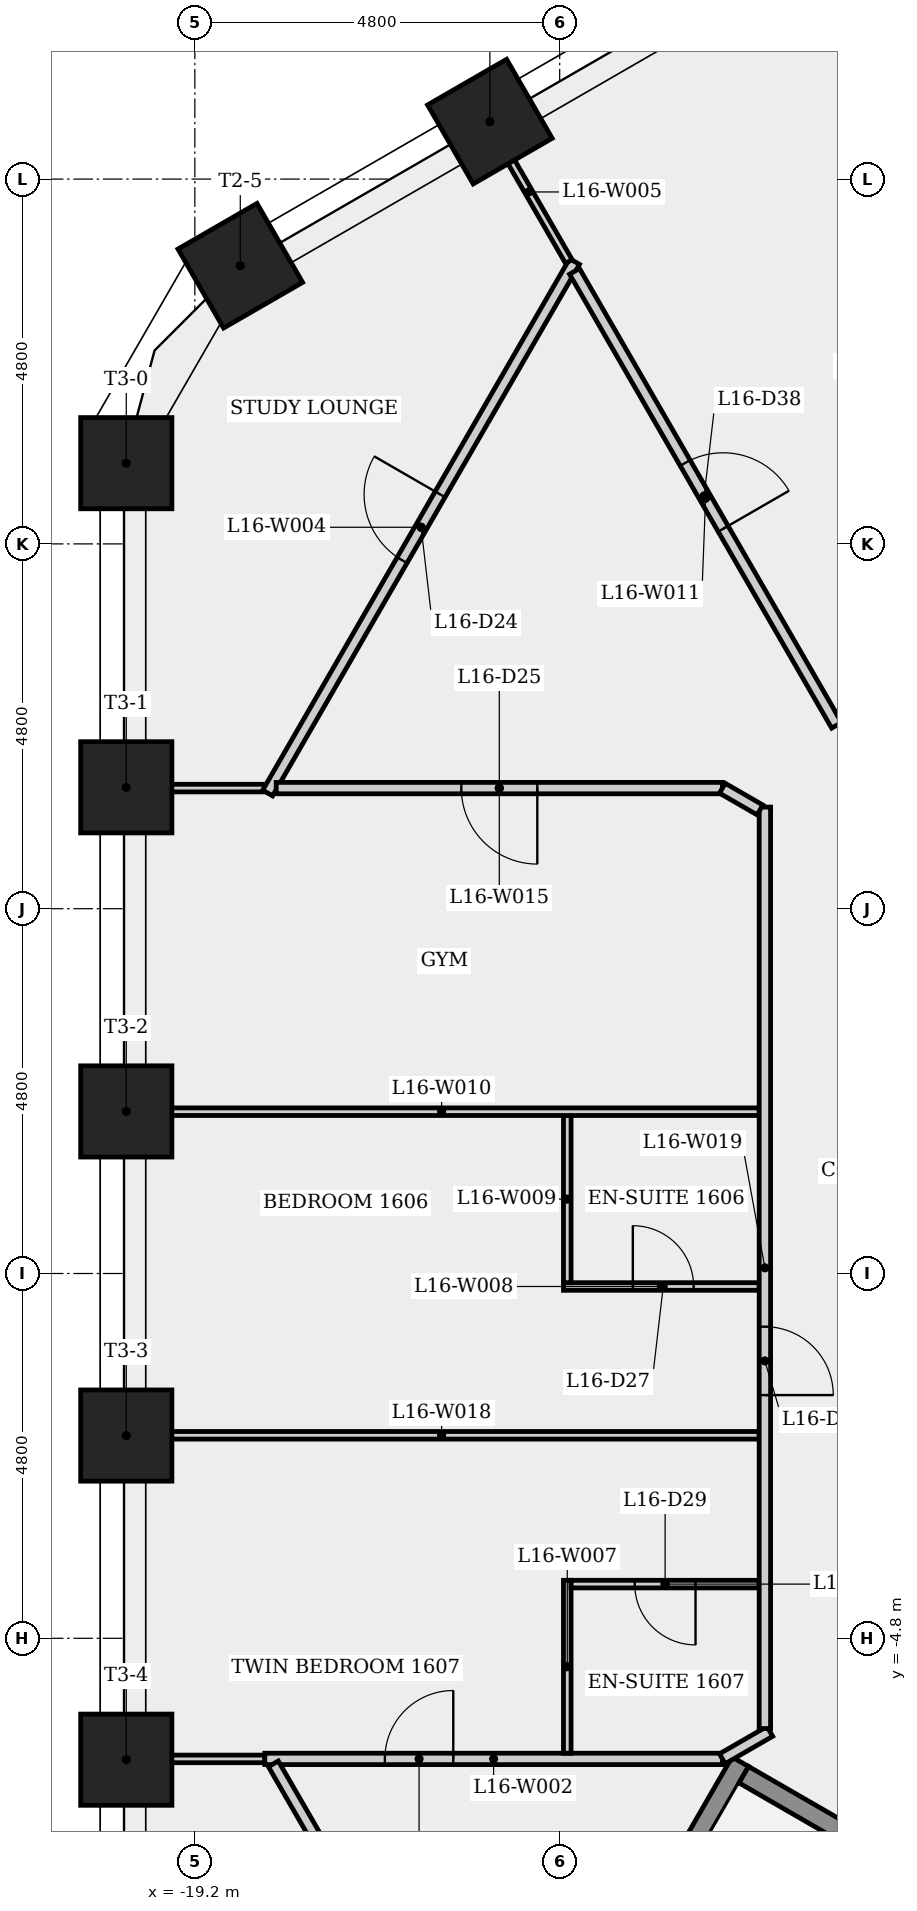
"""IFC4 building model, lengths in metres.
Left out: names, types, materials, properties, quantities, classifications, styles, units other than length and angle.
Written with IfcOpenShell. Run it as: python <this file> out.ifc"""

import sys

from ifc_helpers import new_model, si_unit, direction, frame, frame_2d, origin, origin_2d, place, context, subcontext, project, spatial, rectangle, extrude, element, fill, save


model = new_model("IFC4")
c1 = context("Model", 3, precision=1e-05, world=origin(), true_north=direction((0.0, 1.0)))
c2 = subcontext(c1, "Body", "Model", "MODEL_VIEW")
j1 = project(units=[si_unit("LENGTHUNIT", "METRE"), si_unit("PLANEANGLEUNIT", "RADIAN")], contexts=[c1])
p1 = place(None, origin())
s1 = spatial("IfcSite", under=j1, at=p1, CompositionType="ELEMENT")
p2 = place(p1, origin())
s2 = spatial("IfcBuilding", under=s1, at=p2, CompositionType="ELEMENT")
p3 = place(p2, frame((0.0, 0.0, 62.9)))
s3 = spatial("IfcBuildingStorey", under=s2, at=p3, CompositionType="ELEMENT", Elevation=62.9)
for number, where, z_axis, x_axis in (
    (1, (-15.318, 15.156, 0.0), (0.0, 0.0, 1.0), (-0.5, 0.866, 0.0)),
    (2, (-18.602, 13.26, 0.0), (0.0, 0.0, 1.0), (-0.5, 0.866, 0.0)),
    (3, (-20.102, 10.662, 0.0), (0.0, 0.0, 1.0), (-1.0, 0.0, 0.0)),
    (4, (-20.102, 6.397, 0.0), (0.0, 0.0, 1.0), (-1.0, 0.0, 0.0)),
    (5, (-20.102, 2.132, 0.0), (0.0, 0.0, 1.0), (-1.0, 0.0, 0.0)),
    (6, (-20.102, -2.132, 0.0), (0.0, 0.0, 1.0), (-1.0, 0.0, 0.0)),
    (7, (-20.102, -6.397, 0.0), (0.0, 0.0, 1.0), (-1.0, 0.0, 0.0)),
):
    element("IfcColumn", number, at=place(p3, frame(where, z_axis=z_axis, x_axis=x_axis)), inside=s3, PredefinedType="COLUMN", context=c2, shape_type="SweptSolid", body=[
        extrude(rectangle(XDim=1.2, YDim=1.2, at=origin_2d()), origin(), (0.0, 0.0, 1.0), 3.4),
    ])
p4 = place(p3, frame((-18.28, -6.387, 0.0), z_axis=(0.0, 0.0, 1.0), x_axis=(-1.0, 0.0, 0.0)))
e8 = element("IfcWall", 8, at=p4, inside=s3, PredefinedType="PARTITIONING", context=c2, shape_type="SweptSolid", body=[
    extrude(rectangle(XDim=1.852, YDim=0.1, at=frame_2d((0.926, 0.0))), origin(), (0.0, 0.0, 1.0), 3.0),
])
p5 = place(p3, frame((-18.28, -6.387, 0.0), z_axis=(0.0, 0.0, 1.0), x_axis=(1.0, 0.0, 0.0)))
e9 = element("IfcWall", 9, at=p5, inside=s3, PredefinedType="PARTITIONING", context=c2, shape_type="SweptSolid", body=[
    extrude(rectangle(XDim=6.021, YDim=0.15, at=frame_2d((3.01, 0.0))), origin(), (0.0, 0.0, 1.0), 3.0),
])
p6 = place(p5, frame((1.58, 0.0, 0.0)))
e10 = element("IfcOpeningElement", 10, at=p6, cuts=e9, PredefinedType="OPENING", context=c2, shape_type="SweptSolid", body=[
    extrude(rectangle(XDim=0.9, YDim=2.1, at=frame_2d((0.45, 1.05))), frame((0.0, 0.085, 0.0), z_axis=(0.0, -1.0, 0.0), x_axis=(1.0, 0.0, 0.0)), (0.0, 0.0, 1.0), 0.17),
])
p7 = place(p3, frame((-18.28, 6.387, 0.0), z_axis=(0.0, 0.0, 1.0), x_axis=(-1.0, 0.0, 0.0)))
e11 = element("IfcWall", 11, at=p7, inside=s3, PredefinedType="PARTITIONING", context=c2, shape_type="SweptSolid", body=[
    extrude(rectangle(XDim=1.852, YDim=0.1, at=frame_2d((0.926, 0.0))), origin(), (0.0, 0.0, 1.0), 3.0),
])
p8 = place(p3, frame((-18.242, 6.322, 0.0), z_axis=(0.0, 0.0, 1.0), x_axis=(0.499995499922, 0.86602800189, 0.0)))
e12 = element("IfcWall", 12, at=p8, inside=s3, PredefinedType="PARTITIONING", context=c2, shape_type="SweptSolid", body=[
    extrude(rectangle(XDim=8.075, YDim=0.15, at=frame_2d((4.038, 0.0))), origin(), (0.0, 0.0, 1.0), 3.0),
])
p9 = place(p8, frame((3.538, 0.0, 0.0)))
e13 = element("IfcOpeningElement", 13, at=p9, cuts=e12, PredefinedType="OPENING", context=c2, shape_type="SweptSolid", body=[
    extrude(rectangle(XDim=1.0, YDim=2.1, at=frame_2d((0.5, 1.05))), frame((0.0, 0.085, 0.0), z_axis=(0.0, -1.0, 0.0), x_axis=(1.0, 0.0, 0.0)), (0.0, 0.0, 1.0), 0.17),
])
p10 = place(p3, frame((-15.336, 15.146, 0.0), z_axis=(0.0, 0.0, 1.0), x_axis=(0.499965779899, -0.866045159867, 0.0)))
e14 = element("IfcWall", 14, at=p10, inside=s3, PredefinedType="PARTITIONING", context=c2, shape_type="SweptSolid", body=[
    extrude(rectangle(XDim=2.114, YDim=0.1, at=frame_2d((1.057, 0.0))), origin(), (0.0, 0.0, 1.0), 3.0),
])
p11 = place(p3, frame((-15.065, -11.824, 0.0), z_axis=(0.0, 0.0, 1.0), x_axis=(-0.499999547685, 0.866025664929, 0.0)))
e15 = element("IfcWall", 15, at=p11, inside=s3, PredefinedType="PARTITIONING", context=c2, shape_type="SweptSolid", body=[
    extrude(rectangle(XDim=6.203, YDim=0.15, at=frame_2d((3.102, 0.0))), origin(), (0.0, 0.0, 1.0), 3.0),
])
p12 = place(p11, frame((2.639, 0.0, 0.0)))
e16 = element("IfcOpeningElement", 16, at=p12, cuts=e15, PredefinedType="OPENING", context=c2, shape_type="SweptSolid", body=[
    extrude(rectangle(XDim=1.0, YDim=2.1, at=frame_2d((0.5, 1.05))), frame((0.0, 0.085, 0.0), z_axis=(0.0, -1.0, 0.0), x_axis=(1.0, 0.0, 0.0)), (0.0, 0.0, 1.0), 0.17),
])
p13 = place(p3, frame((-14.3, -4.037, 0.0), z_axis=(0.0, 0.0, 1.0), x_axis=(0.0, -1.0, 0.0)))
e17 = element("IfcWall", 17, at=p13, inside=s3, PredefinedType="PARTITIONING", context=c2, shape_type="SweptSolid", body=[
    extrude(rectangle(XDim=2.275, YDim=0.1, at=frame_2d((1.138, 0.0))), origin(), (0.0, 0.0, 1.0), 3.0),
])
p14 = place(p3, frame((-14.35, -0.171, 0.0), z_axis=(0.0, 0.0, 1.0), x_axis=(1.0, 0.0, 0.0)))
e18 = element("IfcWall", 18, at=p14, inside=s3, PredefinedType="PARTITIONING", context=c2, shape_type="SweptSolid", body=[
    extrude(rectangle(XDim=2.575, YDim=0.1, at=frame_2d((1.288, 0.0))), origin(), (0.0, 0.0, 1.0), 3.0),
])
p15 = place(p14, frame((0.913, 0.0, 0.0)))
e19 = element("IfcOpeningElement", 19, at=p15, cuts=e18, PredefinedType="OPENING", context=c2, shape_type="SweptSolid", body=[
    extrude(rectangle(XDim=0.8, YDim=2.1, at=frame_2d((0.4, 1.05))), frame((0.0, 0.06, 0.0), z_axis=(0.0, -1.0, 0.0), x_axis=(1.0, 0.0, 0.0)), (0.0, 0.0, 1.0), 0.12),
])
p16 = place(p3, frame((-14.3, 2.079, 0.0), z_axis=(0.0, 0.0, 1.0), x_axis=(0.0, -1.0, 0.0)))
e20 = element("IfcWall", 20, at=p16, inside=s3, PredefinedType="PARTITIONING", context=c2, shape_type="SweptSolid", body=[
    extrude(rectangle(XDim=2.2, YDim=0.1, at=frame_2d((1.1, 0.0))), origin(), (0.0, 0.0, 1.0), 3.0),
])
p17 = place(p3, frame((-20.132, 2.129, 0.0), z_axis=(0.0, 0.0, 1.0), x_axis=(1.0, 0.0, 0.0)))
e21 = element("IfcWall", 21, at=p17, inside=s3, PredefinedType="PARTITIONING", context=c2, shape_type="SweptSolid", body=[
    extrude(rectangle(XDim=8.357, YDim=0.1, at=frame_2d((4.178, 0.0))), origin(), (0.0, 0.0, 1.0), 3.0),
])
p18 = place(p3, frame((-14.204, 13.186, 0.0), z_axis=(0.0, 0.0, 1.0), x_axis=(0.500022773673, -0.866012254999, 0.0)))
e22 = element("IfcWall", 22, at=p18, inside=s3, PredefinedType="PARTITIONING", context=c2, shape_type="SweptSolid", body=[
    extrude(rectangle(XDim=6.896, YDim=0.15, at=frame_2d((3.448, 0.0))), origin(), (0.0, 0.0, 1.0), 3.0),
])
p19 = place(p18, frame((2.911, 0.0, 0.0)))
e23 = element("IfcOpeningElement", 23, at=p19, cuts=e22, PredefinedType="OPENING", context=c2, shape_type="SweptSolid", body=[
    extrude(rectangle(XDim=1.0, YDim=2.1, at=frame_2d((0.5, 1.05))), frame((0.0, 0.085, 0.0), z_axis=(0.0, -1.0, 0.0), x_axis=(1.0, 0.0, 0.0)), (0.0, 0.0, 1.0), 0.17),
])
p20 = place(p3, frame((-13.648, -9.239, 0.0), z_axis=(0.0, 0.0, 1.0), x_axis=(0.500017246033, 0.866015446554, 0.0)))
e24 = element("IfcWall", 24, at=p20, inside=s3, PredefinedType="SHEAR", context=c2, shape_type="SweptSolid", body=[
    extrude(rectangle(XDim=3.25, YDim=0.25, at=frame_2d((1.625, 0.0))), origin(), (0.0, 0.0, 1.0), 3.0),
])
p21 = place(p3, frame((-12.26, -6.385, 0.0), z_axis=(0.0, 0.0, 1.0), x_axis=(0.865943239699, 0.500142285375, 0.0)))
e25 = element("IfcWall", 25, at=p21, inside=s3, PredefinedType="PARTITIONING", context=c2, shape_type="SweptSolid", body=[
    extrude(rectangle(XDim=0.721, YDim=0.15, at=frame_2d((0.361, 0.0))), origin(), (0.0, 0.0, 1.0), 3.0),
])
p22 = place(p3, frame((-12.259, 6.387, 0.0), z_axis=(0.0, 0.0, 1.0), x_axis=(-1.0, 0.0, 0.0)))
e26 = element("IfcWall", 26, at=p22, inside=s3, PredefinedType="PARTITIONING", context=c2, shape_type="SweptSolid", body=[
    extrude(rectangle(XDim=5.871, YDim=0.15, at=frame_2d((2.935, 0.0))), origin(), (0.0, 0.0, 1.0), 3.0),
])
p23 = place(p22, frame((2.435, 0.0, 0.0)))
e27 = element("IfcOpeningElement", 27, at=p23, cuts=e26, PredefinedType="OPENING", context=c2, shape_type="SweptSolid", body=[
    extrude(rectangle(XDim=1.0, YDim=2.1, at=frame_2d((0.5, 1.05))), frame((0.0, 0.085, 0.0), z_axis=(0.0, -1.0, 0.0), x_axis=(1.0, 0.0, 0.0)), (0.0, 0.0, 1.0), 0.17),
])
p24 = place(p3, frame((-11.977, -6.595, 0.0), z_axis=(0.0, 0.0, 1.0), x_axis=(0.866025499775, -0.499999833739, 0.0)))
e28 = element("IfcWall", 28, at=p24, inside=s3, PredefinedType="SHEAR", context=c2, shape_type="SweptSolid", body=[
    extrude(rectangle(XDim=6.4, YDim=0.25, at=frame_2d((3.2, 0.0))), origin(), (0.0, 0.0, 1.0), 3.0),
])
p25 = place(p24, frame((5.025, 0.0, 0.0)))
e29 = element("IfcOpeningElement", 29, at=p25, cuts=e28, PredefinedType="OPENING", context=c2, shape_type="SweptSolid", body=[
    extrude(rectangle(XDim=1.0, YDim=2.1, at=frame_2d((0.5, 1.05))), frame((0.0, 0.135, 0.0), z_axis=(0.0, -1.0, 0.0), x_axis=(1.0, 0.0, 0.0)), (0.0, 0.0, 1.0), 0.27),
])
p26 = place(p3, frame((-11.775, -4.087, 0.0), z_axis=(0.0, 0.0, 1.0), x_axis=(-1.0, 0.0, 0.0)))
e30 = element("IfcWall", 30, at=p26, inside=s3, PredefinedType="PARTITIONING", context=c2, shape_type="SweptSolid", body=[
    extrude(rectangle(XDim=2.475, YDim=0.1, at=frame_2d((1.238, 0.0))), origin(), (0.0, 0.0, 1.0), 3.0),
])
p27 = place(p26, frame((0.837, 0.0, 0.0)))
e31 = element("IfcOpeningElement", 31, at=p27, cuts=e30, PredefinedType="OPENING", context=c2, shape_type="SweptSolid", body=[
    extrude(rectangle(XDim=0.8, YDim=2.1, at=frame_2d((0.4, 1.05))), frame((0.0, 0.06, 0.0), z_axis=(0.0, -1.0, 0.0), x_axis=(1.0, 0.0, 0.0)), (0.0, 0.0, 1.0), 0.12),
])
p28 = place(p3, frame((-11.775, -2.129, 0.0), z_axis=(0.0, 0.0, 1.0), x_axis=(-1.0, 0.0, 0.0)))
e32 = element("IfcWall", 32, at=p28, inside=s3, PredefinedType="PARTITIONING", context=c2, shape_type="SweptSolid", body=[
    extrude(rectangle(XDim=8.357, YDim=0.1, at=frame_2d((4.178, 0.0))), origin(), (0.0, 0.0, 1.0), 3.0),
])
p29 = place(p3, frame((-11.7, 6.137, 0.0), z_axis=(0.0, 0.0, 1.0), x_axis=(0.0, -1.0, 0.0)))
e33 = element("IfcWall", 33, at=p29, inside=s3, PredefinedType="PARTITIONING", context=c2, shape_type="SweptSolid", body=[
    extrude(rectangle(XDim=12.125, YDim=0.15, at=frame_2d((6.062, 0.0))), origin(), (0.0, 0.0, 1.0), 3.0),
])
p30 = place(p29, frame((6.837, 0.0, 0.0)))
e34 = element("IfcOpeningElement", 34, at=p30, cuts=e33, PredefinedType="OPENING", context=c2, shape_type="SweptSolid", body=[
    extrude(rectangle(XDim=0.9, YDim=2.1, at=frame_2d((0.45, 1.05))), frame((0.0, 0.085, 0.0), z_axis=(0.0, -1.0, 0.0), x_axis=(1.0, 0.0, 0.0)), (0.0, 0.0, 1.0), 0.17),
])
p31 = place(p3, frame((-11.765, 6.1, 0.0), z_axis=(0.0, 0.0, 1.0), x_axis=(-0.865893856247, 0.500227777832, 0.0)))
e35 = element("IfcWall", 35, at=p31, inside=s3, PredefinedType="PARTITIONING", context=c2, shape_type="SweptSolid", body=[
    extrude(rectangle(XDim=0.572, YDim=0.15, at=frame_2d((0.286, 0.0))), origin(), (0.0, 0.0, 1.0), 3.0),
])
p32 = place(p3, frame((-10.729, 7.316, 0.0), z_axis=(0.0, 0.0, 1.0), x_axis=(0.86603401421, 0.499985086009, 0.0)))
e36 = element("IfcWall", 36, at=p32, inside=s3, PredefinedType="PARTITIONING", context=c2, shape_type="SweptSolid", body=[
    extrude(rectangle(XDim=10.917, YDim=0.15, at=frame_2d((5.458, 0.0))), origin(), (0.0, 0.0, 1.0), 3.0),
])
p33 = place(p9, origin())
e37 = element("IfcDoor", 37, at=p33, inside=s3, OperationType="SINGLE_SWING_RIGHT", PredefinedType="DOOR", context=c2, shape_type="SweptSolid", body=[
    extrude(rectangle(XDim=1.0, YDim=2.1, at=frame_2d((0.5, 1.05))), frame((0.0, 0.025, 0.0), z_axis=(0.0, -1.0, 0.0), x_axis=(1.0, 0.0, 0.0)), (0.0, 0.0, 1.0), 0.05),
])
fill(e13, e37)
p34 = place(p23, origin())
e38 = element("IfcDoor", 38, at=p34, inside=s3, OperationType="SINGLE_SWING_LEFT", PredefinedType="DOOR", context=c2, shape_type="SweptSolid", body=[
    extrude(rectangle(XDim=1.0, YDim=2.1, at=frame_2d((0.5, 1.05))), frame((0.0, 0.025, 0.0), z_axis=(0.0, -1.0, 0.0), x_axis=(1.0, 0.0, 0.0)), (0.0, 0.0, 1.0), 0.05),
])
fill(e27, e38)
p35 = place(p30, origin())
e39 = element("IfcDoor", 39, at=p35, inside=s3, OperationType="SINGLE_SWING_RIGHT", PredefinedType="DOOR", context=c2, shape_type="SweptSolid", body=[
    extrude(rectangle(XDim=0.9, YDim=2.1, at=frame_2d((0.45, 1.05))), frame((0.0, 0.025, 0.0), z_axis=(0.0, -1.0, 0.0), x_axis=(1.0, 0.0, 0.0)), (0.0, 0.0, 1.0), 0.05),
])
fill(e34, e39)
p36 = place(p15, origin())
e40 = element("IfcDoor", 40, at=p36, inside=s3, OperationType="SINGLE_SWING_LEFT", PredefinedType="DOOR", context=c2, shape_type="SweptSolid", body=[
    extrude(rectangle(XDim=0.8, YDim=2.1, at=frame_2d((0.4, 1.05))), frame((0.0, 0.025, 0.0), z_axis=(0.0, -1.0, 0.0), x_axis=(1.0, 0.0, 0.0)), (0.0, 0.0, 1.0), 0.05),
])
fill(e19, e40)
p37 = place(p6, origin())
e41 = element("IfcDoor", 41, at=p37, inside=s3, OperationType="SINGLE_SWING_RIGHT", PredefinedType="DOOR", context=c2, shape_type="SweptSolid", body=[
    extrude(rectangle(XDim=0.9, YDim=2.1, at=frame_2d((0.45, 1.05))), frame((0.0, 0.025, 0.0), z_axis=(0.0, -1.0, 0.0), x_axis=(1.0, 0.0, 0.0)), (0.0, 0.0, 1.0), 0.05),
])
fill(e10, e41)
p38 = place(p27, origin())
e42 = element("IfcDoor", 42, at=p38, inside=s3, OperationType="SINGLE_SWING_LEFT", PredefinedType="DOOR", context=c2, shape_type="SweptSolid", body=[
    extrude(rectangle(XDim=0.8, YDim=2.1, at=frame_2d((0.4, 1.05))), frame((0.0, 0.025, 0.0), z_axis=(0.0, -1.0, 0.0), x_axis=(1.0, 0.0, 0.0)), (0.0, 0.0, 1.0), 0.05),
])
fill(e31, e42)
p39 = place(p19, origin())
e43 = element("IfcDoor", 43, at=p39, inside=s3, OperationType="SINGLE_SWING_RIGHT", PredefinedType="DOOR", context=c2, shape_type="SweptSolid", body=[
    extrude(rectangle(XDim=1.0, YDim=2.1, at=frame_2d((0.5, 1.05))), frame((0.0, 0.025, 0.0), z_axis=(0.0, -1.0, 0.0), x_axis=(1.0, 0.0, 0.0)), (0.0, 0.0, 1.0), 0.05),
])
fill(e23, e43)
save(model, sys.argv[1])
